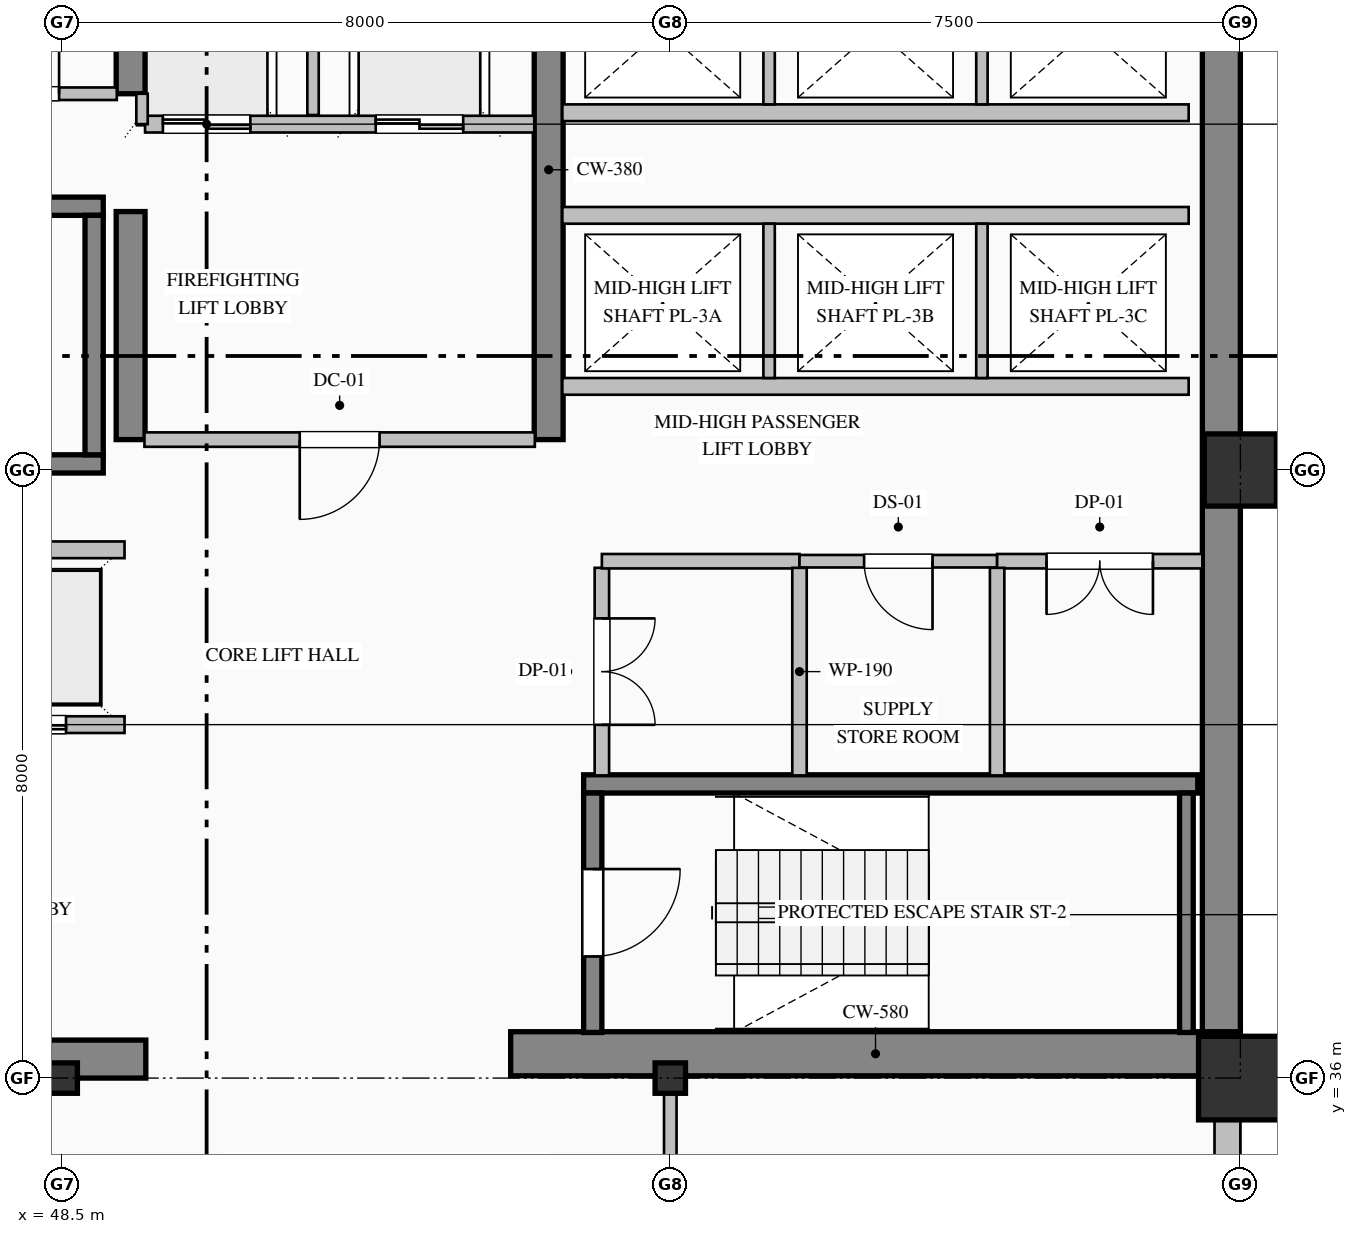
"""IFC4 building model, lengths in metres.
Left out: names, types, materials, properties, quantities, classifications, styles, units other than length and angle.
Written with IfcOpenShell. Run it as: python <this file> out.ifc"""

import sys

from ifc_helpers import new_model, si_unit, direction, frame, frame_2d, origin, origin_2d, place, context, subcontext, project, spatial, rectangle, hollow_rectangle, i_section, extrude, element, fill, save


model = new_model("IFC4")
c1 = context("Model", 3, precision=1e-05, world=origin(), true_north=direction((0.0, 1.0)))
c2 = subcontext(c1, "Body", "Model", "MODEL_VIEW")
j1 = project(units=[si_unit("LENGTHUNIT", "METRE"), si_unit("PLANEANGLEUNIT", "RADIAN")], contexts=[c1])
p1 = place(None, origin())
s1 = spatial("IfcSite", under=j1, at=p1, CompositionType="ELEMENT")
p2 = place(p1, origin())
s2 = spatial("IfcBuilding", under=s1, at=p2, CompositionType="ELEMENT")
p3 = place(p2, frame((0.0, 0.0, 191.0)))
s3 = spatial("IfcBuildingStorey", under=s2, at=p3, CompositionType="ELEMENT", Elevation=191.0)
p4 = place(p3, frame((63.75, 36.32, 0.0), z_axis=(0.0, 0.0, 1.0), x_axis=(0.0, 1.0, 0.0)))
e1 = element("IfcWall", 1, at=p4, inside=s3, PredefinedType="SHEAR", context=c2, shape_type="SweptSolid", body=[
    extrude(rectangle(XDim=15.18, YDim=0.5, at=frame_2d((7.59, 0.0))), origin(), (0.0, 0.0, 1.0), 3.65),
])
p5 = place(p3, frame((40.5, 36.25, 0.0), z_axis=(0.0, 0.0, 1.0), x_axis=(1.0, 0.0, 0.0)))
e2 = element("IfcWall", 2, at=p5, inside=s3, PredefinedType="SHEAR", context=c2, shape_type="SweptSolid", body=[
    extrude(rectangle(XDim=9.1, YDim=0.5, at=frame_2d((4.55, 0.0))), origin(), (0.0, 0.0, 1.0), 3.65),
])
p6 = place(p3, frame((54.4, 36.32, 0.0), z_axis=(0.0, 0.0, 1.0), x_axis=(1.0, 0.0, 0.0)))
e3 = element("IfcWall", 3, at=p6, inside=s3, PredefinedType="SHEAR", context=c2, shape_type="SweptSolid", body=[
    extrude(rectangle(XDim=9.6, YDim=0.58, at=frame_2d((4.8, 0.0))), origin(), (0.0, 0.0, 1.0), 4.0),
])
p7 = place(p3, frame((49.4, 44.4, 0.0), z_axis=(0.0, 0.0, 1.0), x_axis=(0.0, 1.0, 0.0)))
e4 = element("IfcWall", 4, at=p7, inside=s3, PredefinedType="SHEAR", context=c2, shape_type="SweptSolid", body=[
    extrude(rectangle(XDim=3.0, YDim=0.38, at=frame_2d((1.5, 0.0))), origin(), (0.0, 0.0, 1.0), 3.65),
])
p8 = place(p3, frame((49.4, 48.95, 0.0), z_axis=(0.0, 0.0, 1.0), x_axis=(0.0, 1.0, 0.0)))
e5 = element("IfcWall", 5, at=p8, inside=s3, PredefinedType="SHEAR", context=c2, shape_type="SweptSolid", body=[
    extrude(rectangle(XDim=2.55, YDim=0.38, at=frame_2d((1.275, 0.0))), origin(), (0.0, 0.0, 1.0), 3.65),
])
p9 = place(p3, frame((54.9, 44.4, 0.0), z_axis=(0.0, 0.0, 1.0), x_axis=(0.0, 1.0, 0.0)))
e6 = element("IfcWall", 6, at=p9, inside=s3, PredefinedType="SHEAR", context=c2, shape_type="SweptSolid", body=[
    extrude(rectangle(XDim=7.1, YDim=0.38, at=frame_2d((3.55, 0.0))), origin(), (0.0, 0.0, 1.0), 3.65),
])
for number, where, z_axis, x_axis in (
    (7, (48.5, 36.0, 0.0), (0.0, 0.0, 1.0), (1.0, 0.0, 0.0)),
    (8, (56.5, 36.0, 0.0), (0.0, 0.0, 1.0), (1.0, 0.0, 0.0)),
):
    element("IfcColumn", number, at=place(p3, frame(where, z_axis=z_axis, x_axis=x_axis)), inside=s3, PredefinedType="COLUMN", context=c2, shape_type="SweptSolid", body=[
        extrude(i_section(OverallWidth=0.4, OverallDepth=0.4, WebThickness=0.013, FlangeThickness=0.021, FilletRadius=0.022, at=origin_2d()), origin(), (0.0, 0.0, 1.0), 4.0),
    ])
p10 = place(p3, frame((64.0, 36.0, 0.0), z_axis=(0.0, 0.0, 1.0), x_axis=(1.0, 0.0, 0.0)))
e9 = element("IfcColumn", 9, at=p10, inside=s3, PredefinedType="COLUMN", context=c2, shape_type="SweptSolid", body=[
    extrude(hollow_rectangle(XDim=1.1, YDim=1.1, WallThickness=0.04, at=origin_2d()), origin(), (0.0, 0.0, 1.0), 4.0),
])
p11 = place(p3, frame((64.0, 44.0, 0.0), z_axis=(0.0, 0.0, 1.0), x_axis=(1.0, 0.0, 0.0)))
e10 = element("IfcColumn", 10, at=p11, inside=s3, PredefinedType="COLUMN", context=c2, shape_type="SweptSolid", body=[
    extrude(hollow_rectangle(XDim=0.95, YDim=0.95, WallThickness=0.036, at=origin_2d()), origin(), (0.0, 0.0, 1.0), 4.0),
])
p12 = place(p3, frame((63.83, 36.05, 0.0), z_axis=(0.0, 0.0, 1.0), x_axis=(0.0, -1.0, 0.0)))
e11 = element("IfcWall", 11, at=p12, inside=s3, PredefinedType="SOLIDWALL", context=c2, shape_type="SweptSolid", body=[
    extrude(rectangle(XDim=28.05, YDim=0.34, at=frame_2d((14.025, 0.0))), origin(), (0.0, 0.0, 1.0), 3.15),
])
p13 = place(p12, frame((2.775, 0.0, 0.85)))
e12 = element("IfcOpeningElement", 12, at=p13, cuts=e11, PredefinedType="OPENING", context=c2, shape_type="SweptSolid", body=[
    extrude(rectangle(XDim=1.65, YDim=1.95, at=frame_2d((0.825, 0.975))), frame((0.0, 0.18, 0.0), z_axis=(0.0, -1.0, 0.0), x_axis=(1.0, 0.0, 0.0)), (0.0, 0.0, 1.0), 0.36),
])
p14 = place(p12, frame((10.05, 0.0, 0.85)))
e13 = element("IfcOpeningElement", 13, at=p14, cuts=e11, PredefinedType="OPENING", context=c2, shape_type="SweptSolid", body=[
    extrude(rectangle(XDim=1.5, YDim=1.95, at=frame_2d((0.75, 0.975))), frame((0.0, 0.18, 0.0), z_axis=(0.0, -1.0, 0.0), x_axis=(1.0, 0.0, 0.0)), (0.0, 0.0, 1.0), 0.36),
])
for number, where, z_axis, x_axis in (
    (14, (40.96, 47.47, 0.0), (0.0, 0.0, 1.0), (1.0, 0.0, 0.0)),
    (15, (49.04, 44.08, 0.0), (0.0, 0.0, 1.0), (-1.0, 0.0, 0.0)),
):
    element("IfcWall", number, at=place(p3, frame(where, z_axis=z_axis, x_axis=x_axis)), inside=s3, PredefinedType="SOLIDWALL", context=c2, shape_type="SweptSolid", body=[
        extrude(rectangle(XDim=8.08, YDim=0.24, at=frame_2d((4.04, 0.0))), origin(), (0.0, 0.0, 1.0), 4.0),
    ])
p15 = place(p3, frame((48.92, 44.2, 0.0), z_axis=(0.0, 0.0, 1.0), x_axis=(0.0, 1.0, 0.0)))
e16 = element("IfcWall", 16, at=p15, inside=s3, PredefinedType="SOLIDWALL", context=c2, shape_type="SweptSolid", body=[
    extrude(rectangle(XDim=3.15, YDim=0.24, at=frame_2d((1.575, 0.0))), origin(), (0.0, 0.0, 1.0), 4.0),
])
p16 = place(p3, frame((55.36, 39.87, 0.0), z_axis=(0.0, 0.0, 1.0), x_axis=(1.0, 0.0, 0.0)))
e17 = element("IfcWall", 17, at=p16, inside=s3, PredefinedType="SOLIDWALL", context=c2, shape_type="SweptSolid", body=[
    extrude(rectangle(XDim=8.08, YDim=0.24, at=frame_2d((4.04, 0.0))), origin(), (0.0, 0.0, 1.0), 4.0),
])
p17 = place(p3, frame((55.48, 39.75, 0.0), z_axis=(0.0, 0.0, 1.0), x_axis=(0.0, -1.0, 0.0)))
e18 = element("IfcWall", 18, at=p17, inside=s3, PredefinedType="SOLIDWALL", context=c2, shape_type="SweptSolid", body=[
    extrude(rectangle(XDim=3.15, YDim=0.24, at=frame_2d((1.575, 0.0))), origin(), (0.0, 0.0, 1.0), 4.0),
])
p18 = place(p17, frame((1.0, 0.0, 0.0)))
e19 = element("IfcOpeningElement", 19, at=p18, cuts=e18, PredefinedType="OPENING", context=c2, shape_type="SweptSolid", body=[
    extrude(rectangle(XDim=1.15, YDim=2.2, at=frame_2d((0.575, 1.1))), frame((0.0, 0.13, 0.0), z_axis=(0.0, -1.0, 0.0), x_axis=(1.0, 0.0, 0.0)), (0.0, 0.0, 1.0), 0.26),
])
p19 = place(p3, frame((63.29, 36.6, 0.0), z_axis=(0.0, 0.0, 1.0), x_axis=(0.0, 1.0, 0.0)))
e20 = element("IfcWall", 20, at=p19, inside=s3, PredefinedType="SOLIDWALL", context=c2, shape_type="SweptSolid", body=[
    extrude(rectangle(XDim=3.15, YDim=0.18, at=frame_2d((1.575, 0.0))), origin(), (0.0, 0.0, 1.0), 4.0),
])
p20 = place(p3, frame((54.71, 48.55, 0.0), z_axis=(0.0, 0.0, 1.0), x_axis=(-1.0, 0.0, 0.0)))
e21 = element("IfcWall", 21, at=p20, inside=s3, PredefinedType="PARTITIONING", context=c2, shape_type="SweptSolid", body=[
    extrude(rectangle(XDim=5.12, YDim=0.22, at=frame_2d((2.56, 0.0))), origin(), (0.0, 0.0, 1.0), 3.65),
])
p21 = place(p20, frame((3.735, 0.0, 0.0)))
e22 = element("IfcOpeningElement", 22, at=p21, cuts=e21, PredefinedType="OPENING", context=c2, shape_type="SweptSolid", body=[
    extrude(rectangle(XDim=1.15, YDim=2.2, at=frame_2d((0.575, 1.1))), frame((0.0, 0.12, 0.0), z_axis=(0.0, -1.0, 0.0), x_axis=(1.0, 0.0, 0.0)), (0.0, 0.0, 1.0), 0.24),
])
p22 = place(p20, frame((0.935, 0.0, 0.0)))
e23 = element("IfcOpeningElement", 23, at=p22, cuts=e21, PredefinedType="OPENING", context=c2, shape_type="SweptSolid", body=[
    extrude(rectangle(XDim=1.15, YDim=2.2, at=frame_2d((0.575, 1.1))), frame((0.0, 0.12, 0.0), z_axis=(0.0, -1.0, 0.0), x_axis=(1.0, 0.0, 0.0)), (0.0, 0.0, 1.0), 0.24),
])
p23 = place(p3, frame((51.8, 48.67, 0.0), z_axis=(0.0, 0.0, 1.0), x_axis=(0.0, 1.0, 0.0)))
e24 = element("IfcWall", 24, at=p23, inside=s3, PredefinedType="PARTITIONING", context=c2, shape_type="SweptSolid", body=[
    extrude(rectangle(XDim=2.83, YDim=0.15, at=frame_2d((1.415, 0.0))), origin(), (0.0, 0.0, 1.0), 3.65),
])
p24 = place(p3, frame((49.55, 48.55, 0.0), z_axis=(0.0, 0.0, 1.0), x_axis=(0.0, 1.0, 0.0)))
e25 = element("IfcWall", 25, at=p24, inside=s3, PredefinedType="PARTITIONING", context=c2, shape_type="SweptSolid", body=[
    extrude(rectangle(XDim=0.4, YDim=0.15, at=frame_2d((0.2, 0.0))), origin(), (0.0, 0.0, 1.0), 3.65),
])
p25 = place(p3, frame((49.32, 40.65, 0.0), z_axis=(0.0, 0.0, 1.0), x_axis=(-1.0, 0.0, 0.0)))
e26 = element("IfcWall", 26, at=p25, inside=s3, PredefinedType="PARTITIONING", context=c2, shape_type="SweptSolid", body=[
    extrude(rectangle(XDim=8.24, YDim=0.22, at=frame_2d((4.12, 0.0))), origin(), (0.0, 0.0, 1.0), 3.65),
])
p26 = place(p25, frame((6.37, 0.0, 0.0)))
e27 = element("IfcOpeningElement", 27, at=p26, cuts=e26, PredefinedType="OPENING", context=c2, shape_type="SweptSolid", body=[
    extrude(rectangle(XDim=1.1, YDim=2.2, at=frame_2d((0.55, 1.1))), frame((0.0, 0.12, 0.0), z_axis=(0.0, -1.0, 0.0), x_axis=(1.0, 0.0, 0.0)), (0.0, 0.0, 1.0), 0.24),
])
p27 = place(p25, frame((3.57, 0.0, 0.0)))
e28 = element("IfcOpeningElement", 28, at=p27, cuts=e26, PredefinedType="OPENING", context=c2, shape_type="SweptSolid", body=[
    extrude(rectangle(XDim=1.1, YDim=2.2, at=frame_2d((0.55, 1.1))), frame((0.0, 0.12, 0.0), z_axis=(0.0, -1.0, 0.0), x_axis=(1.0, 0.0, 0.0)), (0.0, 0.0, 1.0), 0.24),
])
p28 = place(p25, frame((0.77, 0.0, 0.0)))
e29 = element("IfcOpeningElement", 29, at=p28, cuts=e26, PredefinedType="OPENING", context=c2, shape_type="SweptSolid", body=[
    extrude(rectangle(XDim=1.1, YDim=2.2, at=frame_2d((0.55, 1.1))), frame((0.0, 0.12, 0.0), z_axis=(0.0, -1.0, 0.0), x_axis=(1.0, 0.0, 0.0)), (0.0, 0.0, 1.0), 0.24),
])
for number, where, z_axis, x_axis in (
    (30, (41.08, 42.95, 0.0), (0.0, 0.0, 1.0), (1.0, 0.0, 0.0)),
    (31, (63.32, 45.1, 0.0), (0.0, 0.0, 1.0), (-1.0, 0.0, 0.0)),
    (32, (55.08, 47.35, 0.0), (0.0, 0.0, 1.0), (1.0, 0.0, 0.0)),
):
    element("IfcWall", number, at=place(p3, frame(where, z_axis=z_axis, x_axis=x_axis)), inside=s3, PredefinedType="PARTITIONING", context=c2, shape_type="SweptSolid", body=[
        extrude(rectangle(XDim=8.24, YDim=0.22, at=frame_2d((4.12, 0.0))), origin(), (0.0, 0.0, 1.0), 3.65),
    ])
for number, where, z_axis, x_axis in (
    (33, (57.8, 45.21, 0.0), (0.0, 0.0, 1.0), (0.0, 1.0, 0.0)),
    (34, (60.6, 45.21, 0.0), (0.0, 0.0, 1.0), (0.0, 1.0, 0.0)),
):
    element("IfcWall", number, at=place(p3, frame(where, z_axis=z_axis, x_axis=x_axis)), inside=s3, PredefinedType="PARTITIONING", context=c2, shape_type="SweptSolid", body=[
        extrude(rectangle(XDim=2.03, YDim=0.15, at=frame_2d((1.015, 0.0))), origin(), (0.0, 0.0, 1.0), 3.65),
    ])
p29 = place(p3, frame((63.32, 48.7, 0.0), z_axis=(0.0, 0.0, 1.0), x_axis=(-1.0, 0.0, 0.0)))
e35 = element("IfcWall", 35, at=p29, inside=s3, PredefinedType="PARTITIONING", context=c2, shape_type="SweptSolid", body=[
    extrude(rectangle(XDim=8.24, YDim=0.22, at=frame_2d((4.12, 0.0))), origin(), (0.0, 0.0, 1.0), 3.65),
])
for number, where, z_axis, x_axis in (
    (36, (57.8, 48.81, 0.0), (0.0, 0.0, 1.0), (0.0, 1.0, 0.0)),
    (37, (60.6, 48.81, 0.0), (0.0, 0.0, 1.0), (0.0, 1.0, 0.0)),
):
    element("IfcWall", number, at=place(p3, frame(where, z_axis=z_axis, x_axis=x_axis)), inside=s3, PredefinedType="PARTITIONING", context=c2, shape_type="SweptSolid", body=[
        extrude(rectangle(XDim=2.69, YDim=0.15, at=frame_2d((1.345, 0.0))), origin(), (0.0, 0.0, 1.0), 3.65),
    ])
p30 = place(p3, frame((46.8, 48.95, 0.0), z_axis=(0.0, 0.0, 1.0), x_axis=(1.0, 0.0, 0.0)))
e38 = element("IfcWall", 38, at=p30, inside=s3, PredefinedType="PARTITIONING", context=c2, shape_type="SweptSolid", body=[
    extrude(rectangle(XDim=2.418, YDim=0.165, at=frame_2d((1.209, 0.0))), origin(), (0.0, 0.0, 1.0), 3.65),
])
p31 = place(p30, frame((0.759, 0.0, 0.0)))
e39 = element("IfcOpeningElement", 39, at=p31, cuts=e38, PredefinedType="OPENING", context=c2, shape_type="SweptSolid", body=[
    extrude(rectangle(XDim=0.9, YDim=2.15, at=frame_2d((0.45, 1.075))), frame((0.0, 0.093, 0.0), z_axis=(0.0, -1.0, 0.0), x_axis=(1.0, 0.0, 0.0)), (0.0, 0.0, 1.0), 0.185),
])
p32 = place(p3, frame((54.718, 44.4, 0.0), z_axis=(0.0, 0.0, 1.0), x_axis=(-1.0, 0.0, 0.0)))
e40 = element("IfcWall", 40, at=p32, inside=s3, PredefinedType="PARTITIONING", context=c2, shape_type="SweptSolid", body=[
    extrude(rectangle(XDim=5.136, YDim=0.19, at=frame_2d((2.568, 0.0))), origin(), (0.0, 0.0, 1.0), 3.65),
])
p33 = place(p32, frame((2.043, 0.0, 0.0)))
e41 = element("IfcOpeningElement", 41, at=p33, cuts=e40, PredefinedType="OPENING", context=c2, shape_type="SweptSolid", body=[
    extrude(rectangle(XDim=1.05, YDim=2.15, at=frame_2d((0.525, 1.075))), frame((0.0, 0.105, 0.0), z_axis=(0.0, -1.0, 0.0), x_axis=(1.0, 0.0, 0.0)), (0.0, 0.0, 1.0), 0.21),
])
p34 = place(p3, frame((55.6, 42.713, 0.0), z_axis=(0.0, 0.0, 1.0), x_axis=(0.0, -1.0, 0.0)))
e42 = element("IfcWall", 42, at=p34, inside=s3, PredefinedType="PARTITIONING", context=c2, shape_type="SweptSolid", body=[
    extrude(rectangle(XDim=2.731, YDim=0.19, at=frame_2d((1.365, 0.0))), origin(), (0.0, 0.0, 1.0), 3.65),
])
p35 = place(p34, frame((0.666, 0.0, 0.0)))
e43 = element("IfcOpeningElement", 43, at=p35, cuts=e42, PredefinedType="OPENING", context=c2, shape_type="SweptSolid", body=[
    extrude(rectangle(XDim=1.4, YDim=2.25, at=frame_2d((0.7, 1.125))), frame((0.0, 0.105, 0.0), z_axis=(0.0, -1.0, 0.0), x_axis=(1.0, 0.0, 0.0)), (0.0, 0.0, 1.0), 0.21),
])
p36 = place(p3, frame((58.2, 42.8, 0.0), z_axis=(0.0, 0.0, 1.0), x_axis=(-1.0, 0.0, 0.0)))
e44 = element("IfcWall", 44, at=p36, inside=s3, PredefinedType="PARTITIONING", context=c2, shape_type="SweptSolid", body=[
    extrude(rectangle(XDim=2.6, YDim=0.19, at=frame_2d((1.3, 0.0))), origin(), (0.0, 0.0, 1.0), 3.65),
])
p37 = place(p3, frame((60.8, 42.8, 0.0), z_axis=(0.0, 0.0, 1.0), x_axis=(-1.0, 0.0, 0.0)))
e45 = element("IfcWall", 45, at=p37, inside=s3, PredefinedType="PARTITIONING", context=c2, shape_type="SweptSolid", body=[
    extrude(rectangle(XDim=2.6, YDim=0.165, at=frame_2d((1.3, 0.0))), origin(), (0.0, 0.0, 1.0), 3.65),
])
p38 = place(p37, frame((0.85, 0.0, 0.0)))
e46 = element("IfcOpeningElement", 46, at=p38, cuts=e45, PredefinedType="OPENING", context=c2, shape_type="SweptSolid", body=[
    extrude(rectangle(XDim=0.9, YDim=2.15, at=frame_2d((0.45, 1.075))), frame((0.0, 0.093, 0.0), z_axis=(0.0, -1.0, 0.0), x_axis=(1.0, 0.0, 0.0)), (0.0, 0.0, 1.0), 0.185),
])
p39 = place(p3, frame((63.5, 42.8, 0.0), z_axis=(0.0, 0.0, 1.0), x_axis=(-1.0, 0.0, 0.0)))
e47 = element("IfcWall", 47, at=p39, inside=s3, PredefinedType="PARTITIONING", context=c2, shape_type="SweptSolid", body=[
    extrude(rectangle(XDim=2.7, YDim=0.19, at=frame_2d((1.35, 0.0))), origin(), (0.0, 0.0, 1.0), 3.65),
])
p40 = place(p39, frame((0.65, 0.0, 0.0)))
e48 = element("IfcOpeningElement", 48, at=p40, cuts=e47, PredefinedType="OPENING", context=c2, shape_type="SweptSolid", body=[
    extrude(rectangle(XDim=1.4, YDim=2.25, at=frame_2d((0.7, 1.125))), frame((0.0, 0.105, 0.0), z_axis=(0.0, -1.0, 0.0), x_axis=(1.0, 0.0, 0.0)), (0.0, 0.0, 1.0), 0.21),
])
for number, where, z_axis, x_axis in (
    (49, (58.2, 42.713, 0.0), (0.0, 0.0, 1.0), (0.0, -1.0, 0.0)),
    (50, (60.8, 42.713, 0.0), (0.0, 0.0, 1.0), (0.0, -1.0, 0.0)),
):
    element("IfcWall", number, at=place(p3, frame(where, z_axis=z_axis, x_axis=x_axis)), inside=s3, PredefinedType="PARTITIONING", context=c2, shape_type="SweptSolid", body=[
        extrude(rectangle(XDim=2.731, YDim=0.19, at=frame_2d((1.365, 0.0))), origin(), (0.0, 0.0, 1.0), 3.65),
    ])
p41 = place(p3, frame((56.5, 36.0, 0.0), z_axis=(0.0, 0.0, 1.0), x_axis=(0.0, -1.0, 0.0)))
e51 = element("IfcWall", 51, at=p41, inside=s3, PredefinedType="PARTITIONING", context=c2, shape_type="SweptSolid", body=[
    extrude(rectangle(XDim=2.325, YDim=0.165, at=frame_2d((1.163, 0.0))), origin(), (0.0, 0.0, 1.0), 3.042),
])
p42 = place(p18, origin())
e52 = element("IfcDoor", 52, at=p42, inside=s3, OperationType="SINGLE_SWING_LEFT", PredefinedType="DOOR", context=c2, shape_type="SweptSolid", body=[
    extrude(rectangle(XDim=1.15, YDim=2.2, at=frame_2d((0.575, 1.1))), frame((0.0, 0.025, 0.0), z_axis=(0.0, -1.0, 0.0), x_axis=(1.0, 0.0, 0.0)), (0.0, 0.0, 1.0), 0.05),
])
fill(e19, e52)
p43 = place(p21, origin())
e53 = element("IfcDoor", 53, at=p43, inside=s3, OperationType="DOUBLE_DOOR_SLIDING", PredefinedType="DOOR", context=c2, shape_type="SweptSolid", body=[
    extrude(rectangle(XDim=1.15, YDim=2.2, at=frame_2d((0.575, 1.1))), frame((0.0, 0.025, 0.0), z_axis=(0.0, -1.0, 0.0), x_axis=(1.0, 0.0, 0.0)), (0.0, 0.0, 1.0), 0.05),
])
fill(e22, e53)
p44 = place(p22, origin())
e54 = element("IfcDoor", 54, at=p44, inside=s3, OperationType="DOUBLE_DOOR_SLIDING", PredefinedType="DOOR", context=c2, shape_type="SweptSolid", body=[
    extrude(rectangle(XDim=1.15, YDim=2.2, at=frame_2d((0.575, 1.1))), frame((0.0, 0.025, 0.0), z_axis=(0.0, -1.0, 0.0), x_axis=(1.0, 0.0, 0.0)), (0.0, 0.0, 1.0), 0.05),
])
fill(e23, e54)
p45 = place(p28, origin())
e55 = element("IfcDoor", 55, at=p45, inside=s3, OperationType="DOUBLE_DOOR_SLIDING", PredefinedType="DOOR", context=c2, shape_type="SweptSolid", body=[
    extrude(rectangle(XDim=1.1, YDim=2.2, at=frame_2d((0.55, 1.1))), frame((0.0, 0.025, 0.0), z_axis=(0.0, -1.0, 0.0), x_axis=(1.0, 0.0, 0.0)), (0.0, 0.0, 1.0), 0.05),
])
fill(e29, e55)
p46 = place(p33, origin())
e56 = element("IfcDoor", 56, at=p46, inside=s3, OperationType="SINGLE_SWING_RIGHT", PredefinedType="DOOR", context=c2, shape_type="SweptSolid", body=[
    extrude(rectangle(XDim=1.05, YDim=2.15, at=frame_2d((0.525, 1.075))), frame((0.0, 0.025, 0.0), z_axis=(0.0, -1.0, 0.0), x_axis=(1.0, 0.0, 0.0)), (0.0, 0.0, 1.0), 0.05),
])
fill(e41, e56)
p47 = place(p31, origin())
e57 = element("IfcDoor", 57, at=p47, inside=s3, OperationType="SINGLE_SWING_RIGHT", PredefinedType="DOOR", context=c2, shape_type="SweptSolid", body=[
    extrude(rectangle(XDim=0.9, YDim=2.15, at=frame_2d((0.45, 1.075))), frame((0.0, 0.025, 0.0), z_axis=(0.0, -1.0, 0.0), x_axis=(1.0, 0.0, 0.0)), (0.0, 0.0, 1.0), 0.05),
])
fill(e39, e57)
p48 = place(p35, origin())
e58 = element("IfcDoor", 58, at=p48, inside=s3, OperationType="DOUBLE_DOOR_SINGLE_SWING", PredefinedType="DOOR", context=c2, shape_type="SweptSolid", body=[
    extrude(rectangle(XDim=1.4, YDim=2.25, at=frame_2d((0.7, 1.125))), frame((0.0, 0.025, 0.0), z_axis=(0.0, -1.0, 0.0), x_axis=(1.0, 0.0, 0.0)), (0.0, 0.0, 1.0), 0.05),
])
fill(e43, e58)
p49 = place(p38, origin())
e59 = element("IfcDoor", 59, at=p49, inside=s3, OperationType="SINGLE_SWING_LEFT", PredefinedType="DOOR", context=c2, shape_type="SweptSolid", body=[
    extrude(rectangle(XDim=0.9, YDim=2.15, at=frame_2d((0.45, 1.075))), frame((0.0, 0.025, 0.0), z_axis=(0.0, -1.0, 0.0), x_axis=(1.0, 0.0, 0.0)), (0.0, 0.0, 1.0), 0.05),
])
fill(e46, e59)
p50 = place(p40, origin())
e60 = element("IfcDoor", 60, at=p50, inside=s3, OperationType="DOUBLE_DOOR_SINGLE_SWING", PredefinedType="DOOR", context=c2, shape_type="SweptSolid", body=[
    extrude(rectangle(XDim=1.4, YDim=2.25, at=frame_2d((0.7, 1.125))), frame((0.0, 0.025, 0.0), z_axis=(0.0, -1.0, 0.0), x_axis=(1.0, 0.0, 0.0)), (0.0, 0.0, 1.0), 0.05),
])
fill(e48, e60)
save(model, sys.argv[1])
